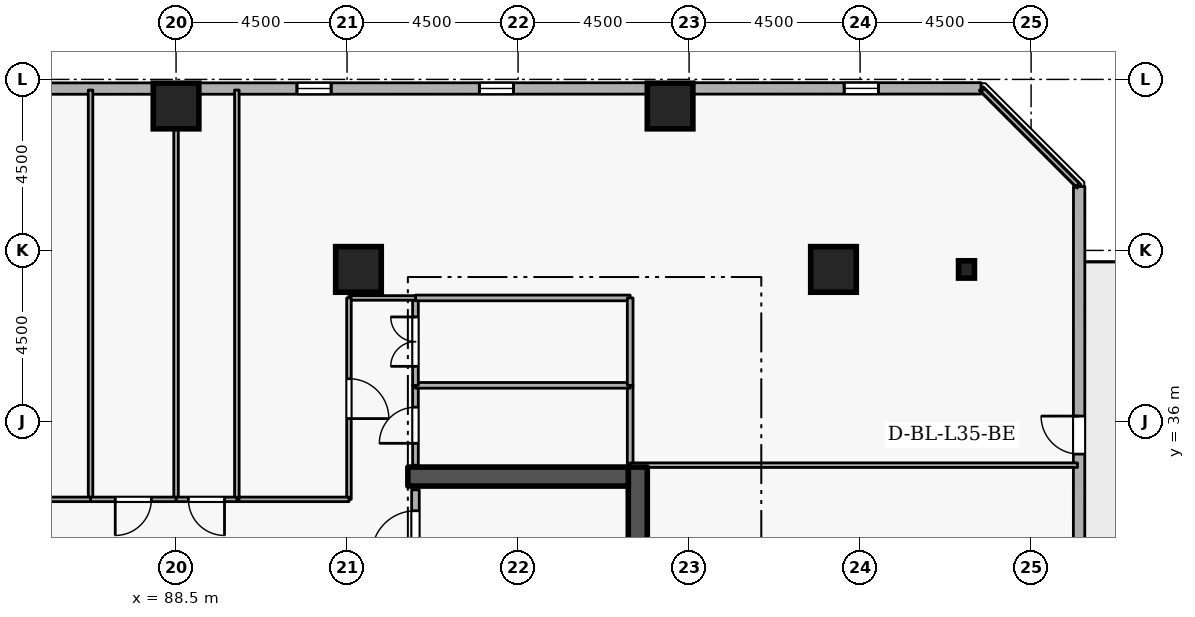
"""IFC4 building model, lengths in metres.
Left out: names, types, materials, properties, quantities, classifications, styles, units other than length and angle.
Written with IfcOpenShell. Run it as: python <this file> out.ifc"""

import sys

from ifc_helpers import new_model, si_unit, direction, frame, frame_2d, origin, origin_2d, place, context, subcontext, project, spatial, rectangle, i_section, extrude, element, fill, save


model = new_model("IFC4")
c1 = context("Model", 3, precision=1e-05, world=origin(), true_north=direction((0.0, 1.0)))
c2 = subcontext(c1, "Body", "Model", "MODEL_VIEW")
j1 = project(units=[si_unit("LENGTHUNIT", "METRE"), si_unit("PLANEANGLEUNIT", "RADIAN")], contexts=[c1])
p1 = place(None, origin())
s1 = spatial("IfcSite", under=j1, at=p1, CompositionType="ELEMENT")
p2 = place(p1, origin())
s2 = spatial("IfcBuilding", under=s1, at=p2, CompositionType="ELEMENT")
p3 = place(p2, frame((0.0, 0.0, 134.1)))
s3 = spatial("IfcBuildingStorey", under=s2, at=p3, CompositionType="ELEMENT", Elevation=134.1)
p4 = place(p3, frame((100.65, 19.2, 0.0), z_axis=(0.0, 0.0, 1.0), x_axis=(0.0, 1.0, 0.0)))
e1 = element("IfcWall", 1, at=p4, inside=s3, PredefinedType="SHEAR", context=c2, shape_type="SweptSolid", body=[
    extrude(rectangle(XDim=15.6, YDim=0.5, at=frame_2d((7.8, 0.0))), origin(), (0.0, 0.0, 1.0), 3.6),
])
p5 = place(p3, frame((94.6, 34.55, 0.0), z_axis=(0.0, 0.0, 1.0), x_axis=(1.0, 0.0, 0.0)))
e2 = element("IfcWall", 2, at=p5, inside=s3, PredefinedType="SHEAR", context=c2, shape_type="SweptSolid", body=[
    extrude(rectangle(XDim=5.8, YDim=0.5, at=frame_2d((2.9, 0.0))), origin(), (0.0, 0.0, 1.0), 3.6),
])
for number, where, z_axis, x_axis in (
    (3, (105.8, 40.0, 0.0), (0.0, 0.0, 1.0), (1.0, 0.0, 0.0)),
    (4, (101.5, 44.3, 0.0), (0.0, 0.0, 1.0), (1.0, 0.0, 0.0)),
    (5, (88.5, 44.3, 0.0), (0.0, 0.0, 1.0), (1.0, 0.0, 0.0)),
    (6, (93.3, 40.0, 0.0), (0.0, 0.0, 1.0), (1.0, 0.0, 0.0)),
):
    element("IfcColumn", number, at=place(p3, frame(where, z_axis=z_axis, x_axis=x_axis)), inside=s3, PredefinedType="COLUMN", context=c2, shape_type="SweptSolid", body=[
        extrude(rectangle(XDim=1.2, YDim=1.2, at=origin_2d()), origin(), (0.0, 0.0, 1.0), 3.6),
    ])
p6 = place(p3, frame((109.3, 40.0, 0.0), z_axis=(0.0, 0.0, 1.0), x_axis=(1.0, 0.0, 0.0)))
e7 = element("IfcColumn", 7, at=p6, inside=s3, PredefinedType="COLUMN", context=c2, shape_type="SweptSolid", body=[
    extrude(i_section(OverallWidth=0.418, OverallDepth=0.456, WebThickness=0.042, FlangeThickness=0.067, FilletRadius=0.015, at=origin_2d()), origin(), (0.0, 0.0, 1.0), 3.6),
])
p7 = place(p3, frame((112.256, 8.301, 0.0), z_axis=(0.0, 0.0, 1.0), x_axis=(0.000244999128, 0.999999969988, 0.0)))
e8 = element("IfcWall", 8, at=p7, inside=s3, PredefinedType="STANDARD", context=c2, shape_type="SweptSolid", body=[
    extrude(rectangle(XDim=33.881, YDim=0.3, at=frame_2d((16.94, 0.0))), origin(), (0.0, 0.0, 1.0), 2.7),
])
p8 = place(p7, frame((26.84, 0.0, 0.0)))
e9 = element("IfcOpeningElement", 9, at=p8, cuts=e8, PredefinedType="OPENING", context=c2, shape_type="SweptSolid", body=[
    extrude(rectangle(XDim=1.0, YDim=2.08, at=frame_2d((0.5, 1.04))), frame((0.0, 0.16, 0.0), z_axis=(0.0, -1.0, 0.0), x_axis=(1.0, 0.0, 0.0)), (0.0, 0.0, 1.0), 0.32),
])
p9 = place(p7, frame((2.7, 0.0, 0.72)))
e10 = element("IfcOpeningElement", 10, at=p9, cuts=e8, PredefinedType="OPENING", context=c2, shape_type="SweptSolid", body=[
    extrude(rectangle(XDim=0.9, YDim=1.75, at=frame_2d((0.45, 0.875))), frame((0.0, 0.16, 0.0), z_axis=(0.0, -1.0, 0.0), x_axis=(1.0, 0.0, 0.0)), (0.0, 0.0, 1.0), 0.32),
])
p10 = place(p7, frame((12.3, 0.0, 0.72)))
e11 = element("IfcOpeningElement", 11, at=p10, cuts=e8, PredefinedType="OPENING", context=c2, shape_type="SweptSolid", body=[
    extrude(rectangle(XDim=0.9, YDim=1.75, at=frame_2d((0.45, 0.875))), frame((0.0, 0.16, 0.0), z_axis=(0.0, -1.0, 0.0), x_axis=(1.0, 0.0, 0.0)), (0.0, 0.0, 1.0), 0.32),
])
p11 = place(p7, frame((17.1, 0.0, 0.72)))
e12 = element("IfcOpeningElement", 12, at=p11, cuts=e8, PredefinedType="OPENING", context=c2, shape_type="SweptSolid", body=[
    extrude(rectangle(XDim=0.9, YDim=1.75, at=frame_2d((0.45, 0.875))), frame((0.0, 0.16, 0.0), z_axis=(0.0, -1.0, 0.0), x_axis=(1.0, 0.0, 0.0)), (0.0, 0.0, 1.0), 0.32),
])
p12 = place(p7, frame((21.9, 0.0, 0.72)))
e13 = element("IfcOpeningElement", 13, at=p12, cuts=e8, PredefinedType="OPENING", context=c2, shape_type="SweptSolid", body=[
    extrude(rectangle(XDim=0.9, YDim=1.75, at=frame_2d((0.45, 0.875))), frame((0.0, 0.16, 0.0), z_axis=(0.0, -1.0, 0.0), x_axis=(1.0, 0.0, 0.0)), (0.0, 0.0, 1.0), 0.32),
])
p13 = place(p3, frame((109.681, 44.765, 0.0), z_axis=(0.0, 0.0, 1.0), x_axis=(-0.999999969988, -0.000244999128, 0.0)))
e14 = element("IfcWall", 14, at=p13, inside=s3, PredefinedType="STANDARD", context=c2, shape_type="SweptSolid", body=[
    extrude(rectangle(XDim=33.881, YDim=0.3, at=frame_2d((16.94, 0.0))), origin(), (0.0, 0.0, 1.0), 2.7),
])
p14 = place(p13, frame((2.7, 0.0, 0.72)))
e15 = element("IfcOpeningElement", 15, at=p14, cuts=e14, PredefinedType="OPENING", context=c2, shape_type="SweptSolid", body=[
    extrude(rectangle(XDim=0.9, YDim=1.75, at=frame_2d((0.45, 0.875))), frame((0.0, 0.16, 0.0), z_axis=(0.0, -1.0, 0.0), x_axis=(1.0, 0.0, 0.0)), (0.0, 0.0, 1.0), 0.32),
])
p15 = place(p13, frame((12.3, 0.0, 0.72)))
e16 = element("IfcOpeningElement", 16, at=p15, cuts=e14, PredefinedType="OPENING", context=c2, shape_type="SweptSolid", body=[
    extrude(rectangle(XDim=0.9, YDim=1.75, at=frame_2d((0.45, 0.875))), frame((0.0, 0.16, 0.0), z_axis=(0.0, -1.0, 0.0), x_axis=(1.0, 0.0, 0.0)), (0.0, 0.0, 1.0), 0.32),
])
p16 = place(p13, frame((17.1, 0.0, 0.72)))
e17 = element("IfcOpeningElement", 17, at=p16, cuts=e14, PredefinedType="OPENING", context=c2, shape_type="SweptSolid", body=[
    extrude(rectangle(XDim=0.9, YDim=1.75, at=frame_2d((0.45, 0.875))), frame((0.0, 0.16, 0.0), z_axis=(0.0, -1.0, 0.0), x_axis=(1.0, 0.0, 0.0)), (0.0, 0.0, 1.0), 0.32),
])
p17 = place(p13, frame((26.7, 0.0, 0.72)))
e18 = element("IfcOpeningElement", 18, at=p17, cuts=e14, PredefinedType="OPENING", context=c2, shape_type="SweptSolid", body=[
    extrude(rectangle(XDim=0.9, YDim=1.75, at=frame_2d((0.45, 0.875))), frame((0.0, 0.16, 0.0), z_axis=(0.0, -1.0, 0.0), x_axis=(1.0, 0.0, 0.0)), (0.0, 0.0, 1.0), 0.32),
])
p18 = place(p3, frame((94.8, 31.95, 0.0), z_axis=(0.0, 0.0, 1.0), x_axis=(0.0, 1.0, 0.0)))
e19 = element("IfcWall", 19, at=p18, inside=s3, PredefinedType="STANDARD", context=c2, shape_type="SweptSolid", body=[
    extrude(rectangle(XDim=2.25, YDim=0.2, at=frame_2d((1.125, 0.0))), origin(), (0.0, 0.0, 1.0), 3.34),
])
p19 = place(p18, frame((0.55, 0.0, 0.0)))
e20 = element("IfcOpeningElement", 20, at=p19, cuts=e19, PredefinedType="OPENING", context=c2, shape_type="SweptSolid", body=[
    extrude(rectangle(XDim=1.15, YDim=2.1, at=frame_2d((0.575, 1.05))), frame((0.0, 0.11, 0.0), z_axis=(0.0, -1.0, 0.0), x_axis=(1.0, 0.0, 0.0)), (0.0, 0.0, 1.0), 0.22),
])
p20 = place(p3, frame((100.45, 36.95, 0.0), z_axis=(0.0, 0.0, 1.0), x_axis=(0.0, -1.0, 0.0)))
e21 = element("IfcWall", 21, at=p20, inside=s3, PredefinedType="PARTITIONING", context=c2, shape_type="SweptSolid", body=[
    extrude(rectangle(XDim=2.1, YDim=0.15, at=frame_2d((1.05, 0.0))), origin(), (0.0, 0.0, 1.0), 3.34),
])
p21 = place(p3, frame((94.8, 34.85, 0.0), z_axis=(0.0, 0.0, 1.0), x_axis=(0.0, 1.0, 0.0)))
e22 = element("IfcWall", 22, at=p21, inside=s3, PredefinedType="PARTITIONING", context=c2, shape_type="SweptSolid", body=[
    extrude(rectangle(XDim=2.1, YDim=0.15, at=frame_2d((1.05, 0.0))), origin(), (0.0, 0.0, 1.0), 3.34),
])
p22 = place(p21, frame((0.575, 0.0, 0.0)))
e23 = element("IfcOpeningElement", 23, at=p22, cuts=e22, PredefinedType="OPENING", context=c2, shape_type="SweptSolid", body=[
    extrude(rectangle(XDim=0.95, YDim=2.1, at=frame_2d((0.475, 1.05))), frame((0.0, 0.085, 0.0), z_axis=(0.0, -1.0, 0.0), x_axis=(1.0, 0.0, 0.0)), (0.0, 0.0, 1.0), 0.17),
])
p23 = place(p3, frame((94.8, 36.95, 0.0), z_axis=(0.0, 0.0, 1.0), x_axis=(1.0, 0.0, 0.0)))
e24 = element("IfcWall", 24, at=p23, inside=s3, PredefinedType="PARTITIONING", context=c2, shape_type="SweptSolid", body=[
    extrude(rectangle(XDim=5.65, YDim=0.15, at=frame_2d((2.825, 0.0))), origin(), (0.0, 0.0, 1.0), 3.34),
])
p24 = place(p3, frame((94.8, 36.95, 0.0), z_axis=(0.0, 0.0, 1.0), x_axis=(0.0, 1.0, 0.0)))
e25 = element("IfcWall", 25, at=p24, inside=s3, PredefinedType="PARTITIONING", context=c2, shape_type="SweptSolid", body=[
    extrude(rectangle(XDim=2.3, YDim=0.15, at=frame_2d((1.15, 0.0))), origin(), (0.0, 0.0, 1.0), 3.34),
])
p25 = place(p24, frame((0.5, 0.0, 0.0)))
e26 = element("IfcOpeningElement", 26, at=p25, cuts=e25, PredefinedType="OPENING", context=c2, shape_type="SweptSolid", body=[
    extrude(rectangle(XDim=1.3, YDim=2.12, at=frame_2d((0.65, 1.06))), frame((0.0, 0.085, 0.0), z_axis=(0.0, -1.0, 0.0), x_axis=(1.0, 0.0, 0.0)), (0.0, 0.0, 1.0), 0.17),
])
p26 = place(p3, frame((94.8, 39.25, 0.0), z_axis=(0.0, 0.0, 1.0), x_axis=(1.0, 0.0, 0.0)))
e27 = element("IfcWall", 27, at=p26, inside=s3, PredefinedType="PARTITIONING", context=c2, shape_type="SweptSolid", body=[
    extrude(rectangle(XDim=5.65, YDim=0.15, at=frame_2d((2.825, 0.0))), origin(), (0.0, 0.0, 1.0), 3.34),
])
p27 = place(p3, frame((100.45, 39.25, 0.0), z_axis=(0.0, 0.0, 1.0), x_axis=(0.0, -1.0, 0.0)))
e28 = element("IfcWall", 28, at=p27, inside=s3, PredefinedType="PARTITIONING", context=c2, shape_type="SweptSolid", body=[
    extrude(rectangle(XDim=2.3, YDim=0.15, at=frame_2d((1.15, 0.0))), origin(), (0.0, 0.0, 1.0), 3.34),
])
p28 = place(p3, frame((94.8, 39.25, 0.0), z_axis=(0.0, 0.0, 1.0), x_axis=(-1.0, 0.0, 0.0)))
e29 = element("IfcWall", 29, at=p28, inside=s3, PredefinedType="PARTITIONING", context=c2, shape_type="SweptSolid", body=[
    extrude(rectangle(XDim=1.75, YDim=0.12, at=frame_2d((0.875, 0.0))), origin(), (0.0, 0.0, 1.0), 3.34),
])
p29 = place(p3, frame((93.05, 39.25, 0.0), z_axis=(0.0, 0.0, 1.0), x_axis=(0.0, -1.0, 0.0)))
e30 = element("IfcWall", 30, at=p29, inside=s3, PredefinedType="PARTITIONING", context=c2, shape_type="SweptSolid", body=[
    extrude(rectangle(XDim=5.3, YDim=0.12, at=frame_2d((2.65, 0.0))), origin(), (0.0, 0.0, 1.0), 3.34),
])
p30 = place(p29, frame((2.125, 0.0, 0.0)))
e31 = element("IfcOpeningElement", 31, at=p30, cuts=e30, PredefinedType="OPENING", context=c2, shape_type="SweptSolid", body=[
    extrude(rectangle(XDim=1.05, YDim=2.1, at=frame_2d((0.525, 1.05))), frame((0.0, 0.07, 0.0), z_axis=(0.0, -1.0, 0.0), x_axis=(1.0, 0.0, 0.0)), (0.0, 0.0, 1.0), 0.14),
])
p31 = place(p3, frame((93.05, 33.95, 0.0), z_axis=(0.0, 0.0, 1.0), x_axis=(-1.0, 0.0, 0.0)))
e32 = element("IfcWall", 32, at=p31, inside=s3, PredefinedType="PARTITIONING", context=c2, shape_type="SweptSolid", body=[
    extrude(rectangle(XDim=2.95, YDim=0.12, at=frame_2d((1.475, 0.0))), origin(), (0.0, 0.0, 1.0), 3.34),
])
p32 = place(p3, frame((90.1, 33.95, 0.0), z_axis=(0.0, 0.0, 1.0), x_axis=(0.0, 1.0, 0.0)))
e33 = element("IfcWall", 33, at=p32, inside=s3, PredefinedType="PARTITIONING", context=c2, shape_type="SweptSolid", body=[
    extrude(rectangle(XDim=10.77, YDim=0.12, at=frame_2d((5.385, 0.0))), origin(), (0.0, 0.0, 1.0), 3.34),
])
p33 = place(p3, frame((109.725, 44.72, 0.0), z_axis=(0.0, 0.0, 1.0), x_axis=(0.707106781187, -0.707106781187, 0.0)))
e34 = element("IfcWall", 34, at=p33, inside=s3, PredefinedType="PARTITIONING", context=c2, shape_type="SweptSolid", body=[
    extrude(rectangle(XDim=3.528, YDim=0.12, at=frame_2d((1.764, 0.0))), origin(), (0.0, 0.0, 1.0), 3.34),
])
p34 = place(p3, frame((112.22, 34.85, 0.0), z_axis=(0.0, 0.0, 1.0), x_axis=(-1.0, 0.0, 0.0)))
e35 = element("IfcWall", 35, at=p34, inside=s3, PredefinedType="PARTITIONING", context=c2, shape_type="SweptSolid", body=[
    extrude(rectangle(XDim=11.77, YDim=0.12, at=frame_2d((5.885, 0.0))), origin(), (0.0, 0.0, 1.0), 2.545),
])
p35 = place(p3, frame((88.5, 33.95, 0.0), z_axis=(0.0, 0.0, 1.0), x_axis=(0.0, 1.0, 0.0)))
e36 = element("IfcWall", 36, at=p35, inside=s3, PredefinedType="PARTITIONING", context=c2, shape_type="SweptSolid", body=[
    extrude(rectangle(XDim=10.77, YDim=0.12, at=frame_2d((5.385, 0.0))), origin(), (0.0, 0.0, 1.0), 2.878),
])
p36 = place(p3, frame((90.1, 33.95, 0.0), z_axis=(0.0, 0.0, 1.0), x_axis=(-1.0, 0.0, 0.0)))
e37 = element("IfcWall", 37, at=p36, inside=s3, PredefinedType="PARTITIONING", context=c2, shape_type="SweptSolid", body=[
    extrude(rectangle(XDim=1.6, YDim=0.12, at=frame_2d((0.8, 0.0))), origin(), (0.0, 0.0, 1.0), 3.34),
])
p37 = place(p36, frame((0.325, 0.0, 0.0)))
e38 = element("IfcOpeningElement", 38, at=p37, cuts=e37, PredefinedType="OPENING", context=c2, shape_type="SweptSolid", body=[
    extrude(rectangle(XDim=0.95, YDim=2.1, at=frame_2d((0.475, 1.05))), frame((0.0, 0.07, 0.0), z_axis=(0.0, -1.0, 0.0), x_axis=(1.0, 0.0, 0.0)), (0.0, 0.0, 1.0), 0.14),
])
p38 = place(p3, frame((86.25, 33.95, 0.0), z_axis=(0.0, 0.0, 1.0), x_axis=(0.0, 1.0, 0.0)))
e39 = element("IfcWall", 39, at=p38, inside=s3, PredefinedType="PARTITIONING", context=c2, shape_type="SweptSolid", body=[
    extrude(rectangle(XDim=10.77, YDim=0.12, at=frame_2d((5.385, 0.0))), origin(), (0.0, 0.0, 1.0), 3.34),
])
p39 = place(p3, frame((88.5, 33.95, 0.0), z_axis=(0.0, 0.0, 1.0), x_axis=(-1.0, 0.0, 0.0)))
e40 = element("IfcWall", 40, at=p39, inside=s3, PredefinedType="PARTITIONING", context=c2, shape_type="SweptSolid", body=[
    extrude(rectangle(XDim=2.25, YDim=0.12, at=frame_2d((1.125, 0.0))), origin(), (0.0, 0.0, 1.0), 3.34),
])
p40 = place(p39, frame((0.65, 0.0, 0.0)))
e41 = element("IfcOpeningElement", 41, at=p40, cuts=e40, PredefinedType="OPENING", context=c2, shape_type="SweptSolid", body=[
    extrude(rectangle(XDim=0.95, YDim=2.1, at=frame_2d((0.475, 1.05))), frame((0.0, 0.07, 0.0), z_axis=(0.0, -1.0, 0.0), x_axis=(1.0, 0.0, 0.0)), (0.0, 0.0, 1.0), 0.14),
])
p41 = place(p3, frame((86.25, 33.95, 0.0), z_axis=(0.0, 0.0, 1.0), x_axis=(-1.0, 0.0, 0.0)))
e42 = element("IfcWall", 42, at=p41, inside=s3, PredefinedType="PARTITIONING", context=c2, shape_type="SweptSolid", body=[
    extrude(rectangle(XDim=2.3, YDim=0.12, at=frame_2d((1.15, 0.0))), origin(), (0.0, 0.0, 1.0), 3.34),
])
p42 = place(p8, origin())
e43 = element("IfcDoor", 43, at=p42, inside=s3, OperationType="SINGLE_SWING_RIGHT", PredefinedType="DOOR", context=c2, shape_type="SweptSolid", body=[
    extrude(rectangle(XDim=1.0, YDim=2.08, at=frame_2d((0.5, 1.04))), frame((0.0, 0.025, 0.0), z_axis=(0.0, -1.0, 0.0), x_axis=(1.0, 0.0, 0.0)), (0.0, 0.0, 1.0), 0.05),
])
fill(e9, e43)
p43 = place(p14, origin())
e44 = element("IfcWindow", 44, at=p43, inside=s3, PartitioningType="SINGLE_PANEL", PredefinedType="WINDOW", context=c2, shape_type="SweptSolid", body=[
    extrude(rectangle(XDim=0.9, YDim=1.75, at=frame_2d((0.45, 0.875))), frame((0.0, 0.03, 0.0), z_axis=(0.0, -1.0, 0.0), x_axis=(1.0, 0.0, 0.0)), (0.0, 0.0, 1.0), 0.06),
])
fill(e15, e44)
p44 = place(p15, origin())
e45 = element("IfcWindow", 45, at=p44, inside=s3, PartitioningType="SINGLE_PANEL", PredefinedType="WINDOW", context=c2, shape_type="SweptSolid", body=[
    extrude(rectangle(XDim=0.9, YDim=1.75, at=frame_2d((0.45, 0.875))), frame((0.0, 0.03, 0.0), z_axis=(0.0, -1.0, 0.0), x_axis=(1.0, 0.0, 0.0)), (0.0, 0.0, 1.0), 0.06),
])
fill(e16, e45)
p45 = place(p16, origin())
e46 = element("IfcWindow", 46, at=p45, inside=s3, PartitioningType="SINGLE_PANEL", PredefinedType="WINDOW", context=c2, shape_type="SweptSolid", body=[
    extrude(rectangle(XDim=0.9, YDim=1.75, at=frame_2d((0.45, 0.875))), frame((0.0, 0.03, 0.0), z_axis=(0.0, -1.0, 0.0), x_axis=(1.0, 0.0, 0.0)), (0.0, 0.0, 1.0), 0.06),
])
fill(e17, e46)
p46 = place(p19, origin())
e47 = element("IfcDoor", 47, at=p46, inside=s3, OperationType="SINGLE_SWING_LEFT", PredefinedType="DOOR", context=c2, shape_type="SweptSolid", body=[
    extrude(rectangle(XDim=1.15, YDim=2.1, at=frame_2d((0.575, 1.05))), frame((0.0, 0.025, 0.0), z_axis=(0.0, -1.0, 0.0), x_axis=(1.0, 0.0, 0.0)), (0.0, 0.0, 1.0), 0.05),
])
fill(e20, e47)
p47 = place(p22, origin())
e48 = element("IfcDoor", 48, at=p47, inside=s3, OperationType="SINGLE_SWING_LEFT", PredefinedType="DOOR", context=c2, shape_type="SweptSolid", body=[
    extrude(rectangle(XDim=0.95, YDim=2.1, at=frame_2d((0.475, 1.05))), frame((0.0, 0.025, 0.0), z_axis=(0.0, -1.0, 0.0), x_axis=(1.0, 0.0, 0.0)), (0.0, 0.0, 1.0), 0.05),
])
fill(e23, e48)
p48 = place(p25, origin())
e49 = element("IfcDoor", 49, at=p48, inside=s3, OperationType="DOUBLE_DOOR_SINGLE_SWING", PredefinedType="DOOR", context=c2, shape_type="SweptSolid", body=[
    extrude(rectangle(XDim=1.3, YDim=2.12, at=frame_2d((0.65, 1.06))), frame((0.0, 0.025, 0.0), z_axis=(0.0, -1.0, 0.0), x_axis=(1.0, 0.0, 0.0)), (0.0, 0.0, 1.0), 0.05),
])
fill(e26, e49)
p49 = place(p30, origin())
e50 = element("IfcDoor", 50, at=p49, inside=s3, OperationType="SINGLE_SWING_RIGHT", PredefinedType="DOOR", context=c2, shape_type="SweptSolid", body=[
    extrude(rectangle(XDim=1.05, YDim=2.1, at=frame_2d((0.525, 1.05))), frame((0.0, 0.025, 0.0), z_axis=(0.0, -1.0, 0.0), x_axis=(1.0, 0.0, 0.0)), (0.0, 0.0, 1.0), 0.05),
])
fill(e31, e50)
p50 = place(p37, origin())
e51 = element("IfcDoor", 51, at=p50, inside=s3, OperationType="SINGLE_SWING_LEFT", PredefinedType="DOOR", context=c2, shape_type="SweptSolid", body=[
    extrude(rectangle(XDim=0.95, YDim=2.1, at=frame_2d((0.475, 1.05))), frame((0.0, 0.025, 0.0), z_axis=(0.0, -1.0, 0.0), x_axis=(1.0, 0.0, 0.0)), (0.0, 0.0, 1.0), 0.05),
])
fill(e38, e51)
p51 = place(p40, origin())
e52 = element("IfcDoor", 52, at=p51, inside=s3, OperationType="SINGLE_SWING_RIGHT", PredefinedType="DOOR", context=c2, shape_type="SweptSolid", body=[
    extrude(rectangle(XDim=0.95, YDim=2.1, at=frame_2d((0.475, 1.05))), frame((0.0, 0.025, 0.0), z_axis=(0.0, -1.0, 0.0), x_axis=(1.0, 0.0, 0.0)), (0.0, 0.0, 1.0), 0.05),
])
fill(e41, e52)
save(model, sys.argv[1])
